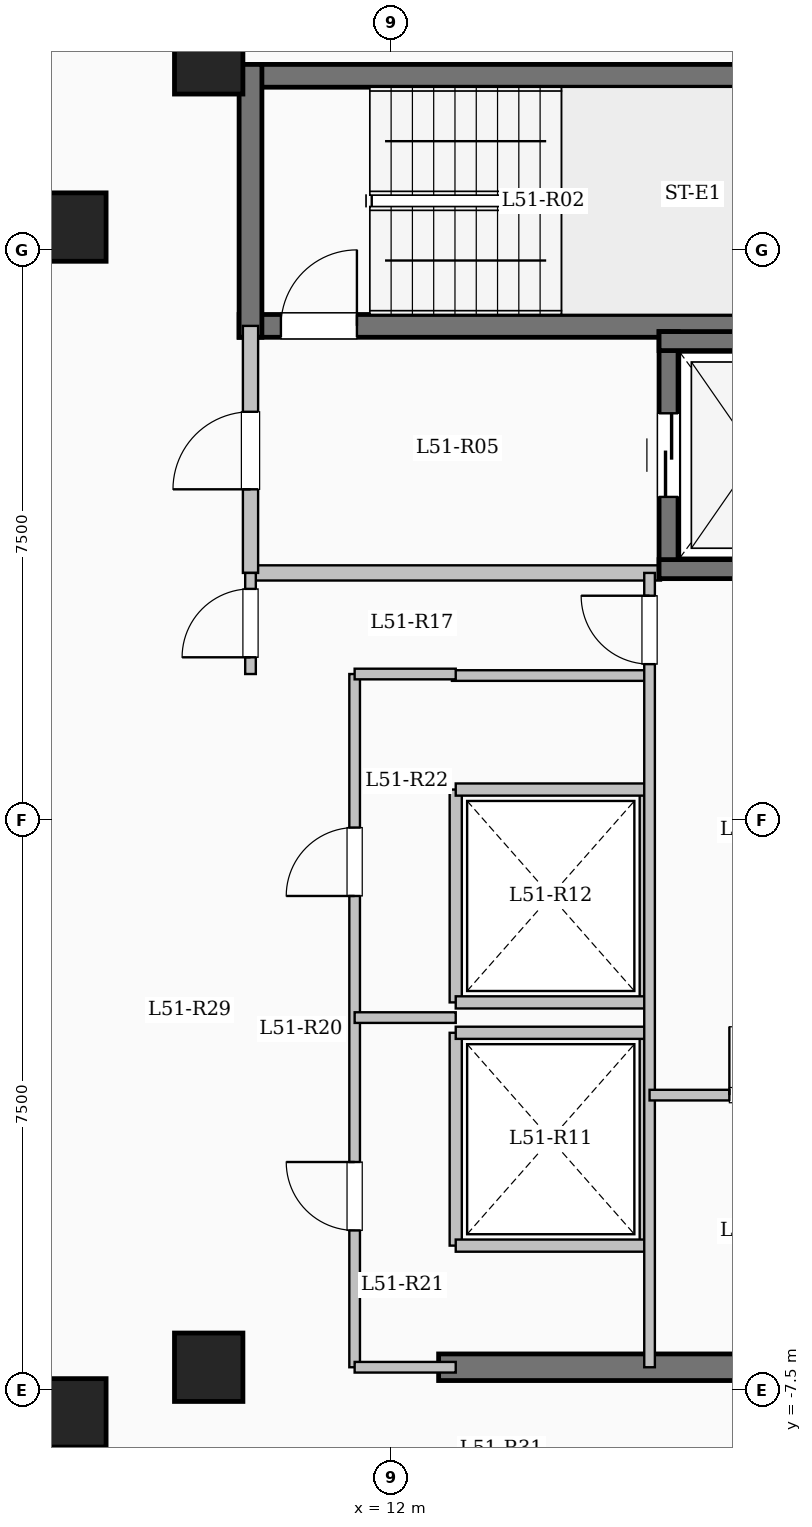
"""IFC4 building model, lengths in metres.
Left out: names, types, materials, properties, quantities, classifications, styles, units other than length and angle.
Written with IfcOpenShell. Run it as: python <this file> out.ifc"""

import sys

from ifc_helpers import new_model, si_unit, direction, frame, frame_2d, origin, origin_2d, place, context, subcontext, project, spatial, rectangle, extrude, element, fill, save


model = new_model("IFC4")
c1 = context("Model", 3, precision=1e-05, world=origin(), true_north=direction((0.0, 1.0)))
c2 = subcontext(c1, "Body", "Model", "MODEL_VIEW")
j1 = project(units=[si_unit("LENGTHUNIT", "METRE"), si_unit("PLANEANGLEUNIT", "RADIAN")], contexts=[c1])
p1 = place(None, origin())
s1 = spatial("IfcSite", under=j1, at=p1, CompositionType="ELEMENT")
p2 = place(p1, origin())
s2 = spatial("IfcBuilding", under=s1, at=p2, CompositionType="ELEMENT")
p3 = place(p2, frame((0.0, 0.0, 190.25)))
s3 = spatial("IfcBuildingStorey", under=s2, at=p3, CompositionType="ELEMENT", Elevation=190.25)
for number, where, z_axis, x_axis in (
    (1, (7.8, -7.8, 0.0), (0.0, 0.0, 1.0), (1.0, 0.0, 0.0)),
    (2, (7.8, 7.8, 0.0), (0.0, 0.0, 1.0), (1.0, 0.0, 0.0)),
    (3, (9.6, -7.2, 0.0), (0.0, 0.0, 1.0), (1.0, 0.0, 0.0)),
    (4, (9.6, 10.0, 0.0), (0.0, 0.0, 1.0), (1.0, 0.0, 0.0)),
):
    element("IfcColumn", number, at=place(p3, frame(where, z_axis=z_axis, x_axis=x_axis)), inside=s3, PredefinedType="COLUMN", context=c2, shape_type="SweptSolid", body=[
        extrude(rectangle(XDim=0.9, YDim=0.9, at=origin_2d()), origin(), (0.0, 0.0, 1.0), 3.35),
    ])
p4 = place(p3, frame((10.0, 9.79, 0.0), z_axis=(0.0, 0.0, 1.0), x_axis=(1.0, 0.0, 0.0)))
e5 = element("IfcWall", 5, at=p4, inside=s3, PredefinedType="SHEAR", context=c2, shape_type="SweptSolid", body=[
    extrude(rectangle(XDim=8.0, YDim=0.3, at=frame_2d((4.0, 0.0))), origin(), (0.0, 0.0, 1.0), 3.35),
])
p5 = place(p3, frame((10.0, 6.5, 0.0), z_axis=(0.0, 0.0, 1.0), x_axis=(1.0, 0.0, 0.0)))
e6 = element("IfcWall", 6, at=p5, inside=s3, PredefinedType="SHEAR", context=c2, shape_type="SweptSolid", body=[
    extrude(rectangle(XDim=8.0, YDim=0.3, at=frame_2d((4.0, 0.0))), origin(), (0.0, 0.0, 1.0), 3.35),
])
p6 = place(p5, frame((0.55, 0.0, 0.0)))
e7 = element("IfcOpeningElement", 7, at=p6, cuts=e6, PredefinedType="OPENING", context=c2, shape_type="SweptSolid", body=[
    extrude(rectangle(XDim=1.0, YDim=2.15, at=frame_2d((0.5, 1.075))), frame((0.0, 0.16, 0.0), z_axis=(0.0, -1.0, 0.0), x_axis=(1.0, 0.0, 0.0)), (0.0, 0.0, 1.0), 0.32),
])
p7 = place(p3, frame((10.15, 6.35, 0.0), z_axis=(0.0, 0.0, 1.0), x_axis=(0.0, 1.0, 0.0)))
e8 = element("IfcWall", 8, at=p7, inside=s3, PredefinedType="SHEAR", context=c2, shape_type="SweptSolid", body=[
    extrude(rectangle(XDim=3.59, YDim=0.3, at=frame_2d((1.795, 0.0))), origin(), (0.0, 0.0, 1.0), 3.35),
])
p8 = place(p3, frame((10.15, 3.25, 0.0), z_axis=(0.0, 0.0, 1.0), x_axis=(1.0, 0.0, 0.0)))
e9 = element("IfcWall", 9, at=p8, inside=s3, PredefinedType="SOLIDWALL", context=c2, shape_type="SweptSolid", body=[
    extrude(rectangle(XDim=5.4, YDim=0.2, at=frame_2d((2.7, 0.0))), origin(), (0.0, 0.0, 1.0), 3.1),
])
p9 = place(p3, frame((10.15, 3.25, 0.0), z_axis=(0.0, 0.0, 1.0), x_axis=(0.0, 1.0, 0.0)))
e10 = element("IfcWall", 10, at=p9, inside=s3, PredefinedType="SOLIDWALL", context=c2, shape_type="SweptSolid", body=[
    extrude(rectangle(XDim=3.25, YDim=0.2, at=frame_2d((1.625, 0.0))), origin(), (0.0, 0.0, 1.0), 3.1),
])
p10 = place(p9, frame((1.1, 0.0, 0.0)))
e11 = element("IfcOpeningElement", 11, at=p10, cuts=e10, PredefinedType="OPENING", context=c2, shape_type="SweptSolid", body=[
    extrude(rectangle(XDim=1.02, YDim=2.15, at=frame_2d((0.51, 1.075))), frame((0.0, 0.11, 0.0), z_axis=(0.0, -1.0, 0.0), x_axis=(1.0, 0.0, 0.0)), (0.0, 0.0, 1.0), 0.22),
])
p11 = place(p3, frame((15.65, 3.175, 0.0), z_axis=(0.0, 0.0, 1.0), x_axis=(0.0, 1.0, 0.0)))
e12 = element("IfcWall", 12, at=p11, inside=s3, PredefinedType="SHEAR", context=c2, shape_type="SweptSolid", body=[
    extrude(rectangle(XDim=3.25, YDim=0.25, at=frame_2d((1.625, 0.0))), origin(), (0.0, 0.0, 1.0), 3.35),
])
p12 = place(p11, frame((1.075, 0.0, 0.0)))
e13 = element("IfcOpeningElement", 13, at=p12, cuts=e12, PredefinedType="OPENING", context=c2, shape_type="SweptSolid", body=[
    extrude(rectangle(XDim=1.1, YDim=2.15, at=frame_2d((0.55, 1.075))), frame((0.0, 0.135, 0.0), z_axis=(0.0, -1.0, 0.0), x_axis=(1.0, 0.0, 0.0)), (0.0, 0.0, 1.0), 0.27),
])
for number, where, z_axis, x_axis in (
    (14, (15.525, 3.3, 0.0), (0.0, 0.0, 1.0), (1.0, 0.0, 0.0)),
    (15, (15.525, 6.3, 0.0), (0.0, 0.0, 1.0), (1.0, 0.0, 0.0)),
):
    element("IfcWall", number, at=place(p3, frame(where, z_axis=z_axis, x_axis=x_axis)), inside=s3, PredefinedType="SHEAR", context=c2, shape_type="SweptSolid", body=[
        extrude(rectangle(XDim=2.55, YDim=0.25, at=frame_2d((1.275, 0.0))), origin(), (0.0, 0.0, 1.0), 3.35),
    ])
for number, where, z_axis, x_axis in (
    (16, (12.85, -5.6, 0.0), (0.0, 0.0, 1.0), (0.0, 1.0, 0.0)),
    (17, (15.35, -5.6, 0.0), (0.0, 0.0, 1.0), (0.0, 1.0, 0.0)),
):
    element("IfcWall", number, at=place(p3, frame(where, z_axis=z_axis, x_axis=x_axis)), inside=s3, PredefinedType="SOLIDWALL", context=c2, shape_type="SweptSolid", body=[
        extrude(rectangle(XDim=2.8, YDim=0.16, at=frame_2d((1.4, 0.0))), origin(), (0.0, 0.0, 1.0), 3.1),
    ])
for number, where, z_axis, x_axis in (
    (18, (12.85, -5.6, 0.0), (0.0, 0.0, 1.0), (1.0, 0.0, 0.0)),
    (19, (12.85, -2.8, 0.0), (0.0, 0.0, 1.0), (1.0, 0.0, 0.0)),
):
    element("IfcWall", number, at=place(p3, frame(where, z_axis=z_axis, x_axis=x_axis)), inside=s3, PredefinedType="SOLIDWALL", context=c2, shape_type="SweptSolid", body=[
        extrude(rectangle(XDim=2.5, YDim=0.16, at=frame_2d((1.25, 0.0))), origin(), (0.0, 0.0, 1.0), 3.1),
    ])
for number, where, z_axis, x_axis in (
    (20, (12.85, -2.4, 0.0), (0.0, 0.0, 1.0), (0.0, 1.0, 0.0)),
    (21, (15.35, -2.4, 0.0), (0.0, 0.0, 1.0), (0.0, 1.0, 0.0)),
):
    element("IfcWall", number, at=place(p3, frame(where, z_axis=z_axis, x_axis=x_axis)), inside=s3, PredefinedType="SOLIDWALL", context=c2, shape_type="SweptSolid", body=[
        extrude(rectangle(XDim=2.8, YDim=0.16, at=frame_2d((1.4, 0.0))), origin(), (0.0, 0.0, 1.0), 3.1),
    ])
for number, where, z_axis, x_axis in (
    (22, (12.85, -2.4, 0.0), (0.0, 0.0, 1.0), (1.0, 0.0, 0.0)),
    (23, (12.85, 0.4, 0.0), (0.0, 0.0, 1.0), (1.0, 0.0, 0.0)),
):
    element("IfcWall", number, at=place(p3, frame(where, z_axis=z_axis, x_axis=x_axis)), inside=s3, PredefinedType="SOLIDWALL", context=c2, shape_type="SweptSolid", body=[
        extrude(rectangle(XDim=2.5, YDim=0.16, at=frame_2d((1.25, 0.0))), origin(), (0.0, 0.0, 1.0), 3.1),
    ])
p13 = place(p3, frame((12.625, -7.2, 0.0), z_axis=(0.0, 0.0, 1.0), x_axis=(1.0, 0.0, 0.0)))
e24 = element("IfcWall", 24, at=p13, inside=s3, PredefinedType="SHEAR", context=c2, shape_type="SweptSolid", body=[
    extrude(rectangle(XDim=6.0, YDim=0.35, at=frame_2d((3.0, 0.0))), origin(), (0.0, 0.0, 1.0), 3.35),
])
p14 = place(p3, frame((12.8, 1.9, 0.0), z_axis=(0.0, 0.0, 1.0), x_axis=(1.0, 0.0, 0.0)))
e25 = element("IfcWall", 25, at=p14, inside=s3, PredefinedType="PARTITIONING", context=c2, shape_type="SweptSolid", body=[
    extrude(rectangle(XDim=2.6, YDim=0.14, at=frame_2d((1.3, 0.0))), origin(), (0.0, 0.0, 1.0), 3.1),
])
p15 = place(p3, frame((10.15, 1.92, 0.0), z_axis=(0.0, 0.0, 1.0), x_axis=(0.0, 1.0, 0.0)))
e26 = element("IfcWall", 26, at=p15, inside=s3, PredefinedType="PARTITIONING", context=c2, shape_type="SweptSolid", body=[
    extrude(rectangle(XDim=1.33, YDim=0.14, at=frame_2d((0.665, 0.0))), origin(), (0.0, 0.0, 1.0), 3.1),
])
p16 = place(p15, frame((0.22, 0.0, 0.0)))
e27 = element("IfcOpeningElement", 27, at=p16, cuts=e26, PredefinedType="OPENING", context=c2, shape_type="SweptSolid", body=[
    extrude(rectangle(XDim=0.9, YDim=2.08, at=frame_2d((0.45, 1.04))), frame((0.0, 0.08, 0.0), z_axis=(0.0, -1.0, 0.0), x_axis=(1.0, 0.0, 0.0)), (0.0, 0.0, 1.0), 0.16),
])
p17 = place(p3, frame((15.4, -7.2, 0.0), z_axis=(0.0, 0.0, 1.0), x_axis=(0.0, 1.0, 0.0)))
e28 = element("IfcWall", 28, at=p17, inside=s3, PredefinedType="PARTITIONING", context=c2, shape_type="SweptSolid", body=[
    extrude(rectangle(XDim=10.45, YDim=0.14, at=frame_2d((5.225, 0.0))), origin(), (0.0, 0.0, 1.0), 3.1),
])
p18 = place(p17, frame((9.25, 0.0, 0.0)))
e29 = element("IfcOpeningElement", 29, at=p18, cuts=e28, PredefinedType="OPENING", context=c2, shape_type="SweptSolid", body=[
    extrude(rectangle(XDim=0.9, YDim=2.08, at=frame_2d((0.45, 1.04))), frame((0.0, 0.08, 0.0), z_axis=(0.0, -1.0, 0.0), x_axis=(1.0, 0.0, 0.0)), (0.0, 0.0, 1.0), 0.16),
])
p19 = place(p3, frame((15.4, -3.62, 0.0), z_axis=(0.0, 0.0, 1.0), x_axis=(1.0, 0.0, 0.0)))
e30 = element("IfcWall", 30, at=p19, inside=s3, PredefinedType="PARTITIONING", context=c2, shape_type="SweptSolid", body=[
    extrude(rectangle(XDim=3.05, YDim=0.14, at=frame_2d((1.525, 0.0))), origin(), (0.0, 0.0, 1.0), 3.1),
])
p20 = place(p19, frame((1.05, 0.0, 0.0)))
e31 = element("IfcOpeningElement", 31, at=p20, cuts=e30, PredefinedType="OPENING", context=c2, shape_type="SweptSolid", body=[
    extrude(rectangle(XDim=0.9, YDim=2.08, at=frame_2d((0.45, 1.04))), frame((0.0, 0.08, 0.0), z_axis=(0.0, -1.0, 0.0), x_axis=(1.0, 0.0, 0.0)), (0.0, 0.0, 1.0), 0.16),
])
p21 = place(p3, frame((11.52, -7.2, 0.0), z_axis=(0.0, 0.0, 1.0), x_axis=(0.0, 1.0, 0.0)))
e32 = element("IfcWall", 32, at=p21, inside=s3, PredefinedType="PARTITIONING", context=c2, shape_type="SweptSolid", body=[
    extrude(rectangle(XDim=9.12, YDim=0.14, at=frame_2d((4.56, 0.0))), origin(), (0.0, 0.0, 1.0), 3.1),
])
p22 = place(p21, frame((1.8, 0.0, 0.0)))
e33 = element("IfcOpeningElement", 33, at=p22, cuts=e32, PredefinedType="OPENING", context=c2, shape_type="SweptSolid", body=[
    extrude(rectangle(XDim=0.9, YDim=2.08, at=frame_2d((0.45, 1.04))), frame((0.0, 0.08, 0.0), z_axis=(0.0, -1.0, 0.0), x_axis=(1.0, 0.0, 0.0)), (0.0, 0.0, 1.0), 0.16),
])
p23 = place(p21, frame((6.2, 0.0, 0.0)))
e34 = element("IfcOpeningElement", 34, at=p23, cuts=e32, PredefinedType="OPENING", context=c2, shape_type="SweptSolid", body=[
    extrude(rectangle(XDim=0.9, YDim=2.08, at=frame_2d((0.45, 1.04))), frame((0.0, 0.08, 0.0), z_axis=(0.0, -1.0, 0.0), x_axis=(1.0, 0.0, 0.0)), (0.0, 0.0, 1.0), 0.16),
])
p24 = place(p3, frame((11.52, 1.92, 0.0), z_axis=(0.0, 0.0, 1.0), x_axis=(1.0, 0.0, 0.0)))
e35 = element("IfcWall", 35, at=p24, inside=s3, PredefinedType="PARTITIONING", context=c2, shape_type="SweptSolid", body=[
    extrude(rectangle(XDim=1.33, YDim=0.14, at=frame_2d((0.665, 0.0))), origin(), (0.0, 0.0, 1.0), 3.1),
])
p25 = place(p3, frame((11.52, -7.2, 0.0), z_axis=(0.0, 0.0, 1.0), x_axis=(1.0, 0.0, 0.0)))
e36 = element("IfcWall", 36, at=p25, inside=s3, PredefinedType="PARTITIONING", context=c2, shape_type="SweptSolid", body=[
    extrude(rectangle(XDim=1.33, YDim=0.14, at=frame_2d((0.665, 0.0))), origin(), (0.0, 0.0, 1.0), 2.235),
])
p26 = place(p3, frame((11.52, -2.6, 0.0), z_axis=(0.0, 0.0, 1.0), x_axis=(1.0, 0.0, 0.0)))
e37 = element("IfcWall", 37, at=p26, inside=s3, PredefinedType="PARTITIONING", context=c2, shape_type="SweptSolid", body=[
    extrude(rectangle(XDim=1.33, YDim=0.14, at=frame_2d((0.665, 0.0))), origin(), (0.0, 0.0, 1.0), 3.1),
])
p27 = place(p6, origin())
e38 = element("IfcDoor", 38, at=p27, inside=s3, OperationType="SINGLE_SWING_RIGHT", PredefinedType="DOOR", context=c2, shape_type="SweptSolid", body=[
    extrude(rectangle(XDim=1.0, YDim=2.15, at=frame_2d((0.5, 1.075))), frame((0.0, 0.025, 0.0), z_axis=(0.0, -1.0, 0.0), x_axis=(1.0, 0.0, 0.0)), (0.0, 0.0, 1.0), 0.05),
])
fill(e7, e38)
p28 = place(p10, origin())
e39 = element("IfcDoor", 39, at=p28, inside=s3, OperationType="SINGLE_SWING_LEFT", PredefinedType="DOOR", context=c2, shape_type="SweptSolid", body=[
    extrude(rectangle(XDim=1.02, YDim=2.15, at=frame_2d((0.51, 1.075))), frame((0.0, 0.025, 0.0), z_axis=(0.0, -1.0, 0.0), x_axis=(1.0, 0.0, 0.0)), (0.0, 0.0, 1.0), 0.05),
])
fill(e11, e39)
p29 = place(p12, origin())
e40 = element("IfcDoor", 40, at=p29, inside=s3, OperationType="SLIDING_TO_LEFT", PredefinedType="DOOR", context=c2, shape_type="SweptSolid", body=[
    extrude(rectangle(XDim=1.1, YDim=2.15, at=frame_2d((0.55, 1.075))), frame((0.0, 0.025, 0.0), z_axis=(0.0, -1.0, 0.0), x_axis=(1.0, 0.0, 0.0)), (0.0, 0.0, 1.0), 0.05),
])
fill(e13, e40)
p30 = place(p16, origin())
e41 = element("IfcDoor", 41, at=p30, inside=s3, OperationType="SINGLE_SWING_LEFT", PredefinedType="DOOR", context=c2, shape_type="SweptSolid", body=[
    extrude(rectangle(XDim=0.9, YDim=2.08, at=frame_2d((0.45, 1.04))), frame((0.0, 0.025, 0.0), z_axis=(0.0, -1.0, 0.0), x_axis=(1.0, 0.0, 0.0)), (0.0, 0.0, 1.0), 0.05),
])
fill(e27, e41)
p31 = place(p18, origin())
e42 = element("IfcDoor", 42, at=p31, inside=s3, OperationType="SINGLE_SWING_RIGHT", PredefinedType="DOOR", context=c2, shape_type="SweptSolid", body=[
    extrude(rectangle(XDim=0.9, YDim=2.08, at=frame_2d((0.45, 1.04))), frame((0.0, 0.025, 0.0), z_axis=(0.0, -1.0, 0.0), x_axis=(1.0, 0.0, 0.0)), (0.0, 0.0, 1.0), 0.05),
])
fill(e29, e42)
p32 = place(p20, origin())
e43 = element("IfcDoor", 43, at=p32, inside=s3, OperationType="SINGLE_SWING_LEFT", PredefinedType="DOOR", context=c2, shape_type="SweptSolid", body=[
    extrude(rectangle(XDim=0.9, YDim=2.08, at=frame_2d((0.45, 1.04))), frame((0.0, 0.025, 0.0), z_axis=(0.0, -1.0, 0.0), x_axis=(1.0, 0.0, 0.0)), (0.0, 0.0, 1.0), 0.05),
])
fill(e31, e43)
p33 = place(p22, origin())
e44 = element("IfcDoor", 44, at=p33, inside=s3, OperationType="SINGLE_SWING_RIGHT", PredefinedType="DOOR", context=c2, shape_type="SweptSolid", body=[
    extrude(rectangle(XDim=0.9, YDim=2.08, at=frame_2d((0.45, 1.04))), frame((0.0, 0.025, 0.0), z_axis=(0.0, -1.0, 0.0), x_axis=(1.0, 0.0, 0.0)), (0.0, 0.0, 1.0), 0.05),
])
fill(e33, e44)
p34 = place(p23, origin())
e45 = element("IfcDoor", 45, at=p34, inside=s3, OperationType="SINGLE_SWING_LEFT", PredefinedType="DOOR", context=c2, shape_type="SweptSolid", body=[
    extrude(rectangle(XDim=0.9, YDim=2.08, at=frame_2d((0.45, 1.04))), frame((0.0, 0.025, 0.0), z_axis=(0.0, -1.0, 0.0), x_axis=(1.0, 0.0, 0.0)), (0.0, 0.0, 1.0), 0.05),
])
fill(e34, e45)
save(model, sys.argv[1])
